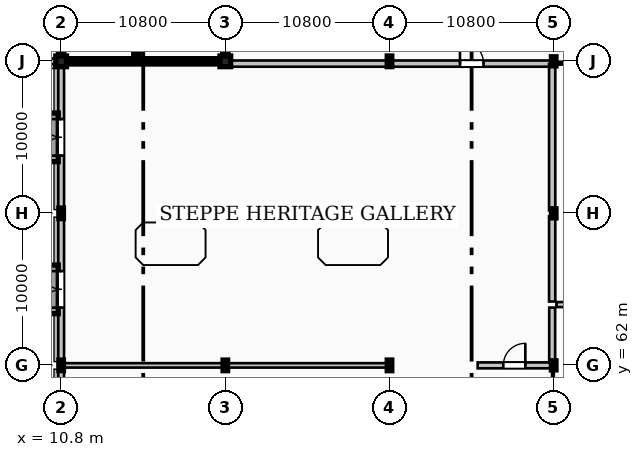
"""IFC4 building model, lengths in metres.
Left out: names, types, materials, properties, quantities, classifications, styles, units other than length and angle.
Written with IfcOpenShell. Run it as: python <this file> out.ifc"""

import sys

from ifc_helpers import new_model, si_unit, direction, frame, frame_2d, origin, origin_2d, place, context, subcontext, project, spatial, rectangle, i_section, extrude, element, fill, save


model = new_model("IFC4")
c1 = context("Model", 3, precision=1e-05, world=origin(), true_north=direction((0.0, 1.0)))
c2 = subcontext(c1, "Body", "Model", "MODEL_VIEW")
j1 = project(units=[si_unit("LENGTHUNIT", "METRE"), si_unit("PLANEANGLEUNIT", "RADIAN")], contexts=[c1])
p1 = place(None, origin())
s1 = spatial("IfcSite", under=j1, at=p1, CompositionType="ELEMENT")
p2 = place(p1, origin())
s2 = spatial("IfcBuilding", under=s1, at=p2, CompositionType="ELEMENT")
p3 = place(p2, origin())
s3 = spatial("IfcBuildingStorey", under=s2, at=p3, CompositionType="ELEMENT", Elevation=0.0)
for number, where, z_axis, x_axis in (
    (1, (10.8, 62.0, 0.0), (0.0, 0.0, 1.0), (1.0, 0.0, 0.0)),
    (2, (10.8, 72.0, 0.0), (0.0, 0.0, 1.0), (1.0, 0.0, 0.0)),
):
    element("IfcColumn", number, at=place(p3, frame(where, z_axis=z_axis, x_axis=x_axis)), inside=s3, PredefinedType="COLUMN", context=c2, shape_type="SweptSolid", body=[
        extrude(i_section(OverallWidth=0.3, OverallDepth=0.7, WebThickness=0.017, FlangeThickness=0.032, FilletRadius=0.027, at=origin_2d()), origin(), (0.0, 0.0, 1.0), 4.8),
    ])
p4 = place(p3, frame((10.8, 82.0, 0.0), z_axis=(0.0, 0.0, 1.0), x_axis=(1.0, 0.0, 0.0)))
e3 = element("IfcColumn", 3, at=p4, inside=s3, PredefinedType="COLUMN", context=c2, shape_type="SweptSolid", body=[
    extrude(rectangle(XDim=0.7, YDim=0.7, at=origin_2d()), origin(), (0.0, 0.0, 1.0), 4.8),
])
for number, where, z_axis, x_axis in (
    (4, (21.6, 62.0, 0.0), (0.0, 0.0, 1.0), (1.0, 0.0, 0.0)),
    (5, (21.6, 72.0, 0.0), (0.0, 0.0, 1.0), (1.0, 0.0, 0.0)),
):
    element("IfcColumn", number, at=place(p3, frame(where, z_axis=z_axis, x_axis=x_axis)), inside=s3, PredefinedType="COLUMN", context=c2, shape_type="SweptSolid", body=[
        extrude(i_section(OverallWidth=0.3, OverallDepth=0.7, WebThickness=0.017, FlangeThickness=0.032, FilletRadius=0.027, at=origin_2d()), origin(), (0.0, 0.0, 1.0), 4.8),
    ])
p5 = place(p3, frame((21.6, 82.0, 0.0), z_axis=(0.0, 0.0, 1.0), x_axis=(1.0, 0.0, 0.0)))
e6 = element("IfcColumn", 6, at=p5, inside=s3, PredefinedType="COLUMN", context=c2, shape_type="SweptSolid", body=[
    extrude(rectangle(XDim=0.7, YDim=0.7, at=origin_2d()), origin(), (0.0, 0.0, 1.0), 4.8),
])
for number, where, z_axis, x_axis in (
    (7, (32.4, 62.0, 0.0), (0.0, 0.0, 1.0), (1.0, 0.0, 0.0)),
    (8, (32.4, 72.0, 0.0), (0.0, 0.0, 1.0), (1.0, 0.0, 0.0)),
    (9, (32.4, 82.0, 0.0), (0.0, 0.0, 1.0), (1.0, 0.0, 0.0)),
):
    element("IfcColumn", number, at=place(p3, frame(where, z_axis=z_axis, x_axis=x_axis)), inside=s3, PredefinedType="COLUMN", context=c2, shape_type="SweptSolid", body=[
        extrude(i_section(OverallWidth=0.3, OverallDepth=0.7, WebThickness=0.017, FlangeThickness=0.032, FilletRadius=0.027, at=origin_2d()), origin(), (0.0, 0.0, 1.0), 4.8),
    ])
for number, where, z_axis, x_axis in (
    (10, (43.2, 62.0, 0.0), (0.0, 0.0, 1.0), (1.0, 0.0, 0.0)),
    (11, (43.2, 72.0, 0.0), (0.0, 0.0, 1.0), (1.0, 0.0, 0.0)),
    (12, (43.2, 82.0, 0.0), (0.0, 0.0, 1.0), (1.0, 0.0, 0.0)),
):
    element("IfcColumn", number, at=place(p3, frame(where, z_axis=z_axis, x_axis=x_axis)), inside=s3, PredefinedType="COLUMN", context=c2, shape_type="SweptSolid", body=[
        extrude(i_section(OverallWidth=0.3, OverallDepth=0.6, WebThickness=0.015, FlangeThickness=0.03, FilletRadius=0.027, at=origin_2d()), origin(), (0.0, 0.0, 1.0), 4.8),
    ])
p6 = place(p3, frame((0.145, 82.0, 0.0), z_axis=(0.0, 0.0, 1.0), x_axis=(1.0, 0.0, 0.0)))
e13 = element("IfcWall", 13, at=p6, inside=s3, PredefinedType="STANDARD", context=c2, shape_type="SweptSolid", body=[
    extrude(rectangle(XDim=10.51, YDim=0.38, at=frame_2d((5.255, 0.0))), origin(), (0.0, 0.0, 1.0), 4.009),
])
p7 = place(p6, frame((3.805, 0.0, 1.0)))
e14 = element("IfcOpeningElement", 14, at=p7, cuts=e13, PredefinedType="OPENING", context=c2, shape_type="SweptSolid", body=[
    extrude(rectangle(XDim=2.9, YDim=2.5, at=frame_2d((1.45, 1.25))), frame((0.0, 0.2, 0.0), z_axis=(0.0, -1.0, 0.0), x_axis=(1.0, 0.0, 0.0)), (0.0, 0.0, 1.0), 0.4),
])
p8 = place(p6, frame((7.655, 0.0, 0.0)))
e15 = element("IfcOpeningElement", 15, at=p8, cuts=e13, PredefinedType="OPENING", context=c2, shape_type="SweptSolid", body=[
    extrude(rectangle(XDim=2.0, YDim=2.3, at=frame_2d((1.0, 1.15))), frame((0.0, 0.2, 0.0), z_axis=(0.0, -1.0, 0.0), x_axis=(1.0, 0.0, 0.0)), (0.0, 0.0, 1.0), 0.4),
])
p9 = place(p3, frame((10.8, 81.855, 0.0), z_axis=(0.0, 0.0, 1.0), x_axis=(0.0, -1.0, 0.0)))
e16 = element("IfcWall", 16, at=p9, inside=s3, PredefinedType="STANDARD", context=c2, shape_type="SweptSolid", body=[
    extrude(rectangle(XDim=9.71, YDim=0.38, at=frame_2d((4.855, 0.0))), origin(), (0.0, 0.0, 1.0), 4.04),
])
p10 = place(p9, frame((3.655, 0.0, 0.0)))
e17 = element("IfcOpeningElement", 17, at=p10, cuts=e16, PredefinedType="OPENING", context=c2, shape_type="SweptSolid", body=[
    extrude(rectangle(XDim=2.4, YDim=2.6, at=frame_2d((1.2, 1.3))), frame((0.0, 0.2, 0.0), z_axis=(0.0, -1.0, 0.0), x_axis=(1.0, 0.0, 0.0)), (0.0, 0.0, 1.0), 0.4),
])
p11 = place(p3, frame((10.8, 71.855, 0.0), z_axis=(0.0, 0.0, 1.0), x_axis=(0.0, -1.0, 0.0)))
e18 = element("IfcWall", 18, at=p11, inside=s3, PredefinedType="STANDARD", context=c2, shape_type="SweptSolid", body=[
    extrude(rectangle(XDim=9.71, YDim=0.38, at=frame_2d((4.855, 0.0))), origin(), (0.0, 0.0, 1.0), 4.04),
])
p12 = place(p11, frame((3.655, 0.0, 0.0)))
e19 = element("IfcOpeningElement", 19, at=p12, cuts=e18, PredefinedType="OPENING", context=c2, shape_type="SweptSolid", body=[
    extrude(rectangle(XDim=2.4, YDim=2.6, at=frame_2d((1.2, 1.3))), frame((0.0, 0.2, 0.0), z_axis=(0.0, -1.0, 0.0), x_axis=(1.0, 0.0, 0.0)), (0.0, 0.0, 1.0), 0.4),
])
p13 = place(p3, frame((10.8, 61.855, 0.0), z_axis=(0.0, 0.0, 1.0), x_axis=(0.0, -1.0, 0.0)))
e20 = element("IfcWall", 20, at=p13, inside=s3, PredefinedType="STANDARD", context=c2, shape_type="SweptSolid", body=[
    extrude(rectangle(XDim=11.71, YDim=0.38, at=frame_2d((5.855, 0.0))), origin(), (0.0, 0.0, 1.0), 3.939),
])
p14 = place(p13, frame((4.655, 0.0, 0.0)))
e21 = element("IfcOpeningElement", 21, at=p14, cuts=e20, PredefinedType="OPENING", context=c2, shape_type="SweptSolid", body=[
    extrude(rectangle(XDim=2.4, YDim=2.6, at=frame_2d((1.2, 1.3))), frame((0.0, 0.2, 0.0), z_axis=(0.0, -1.0, 0.0), x_axis=(1.0, 0.0, 0.0)), (0.0, 0.0, 1.0), 0.4),
])
p15 = place(p3, frame((11.15, 82.0, 0.0), z_axis=(0.0, 0.0, 1.0), x_axis=(1.0, 0.0, 0.0)))
e22 = element("IfcWall", 22, at=p15, inside=s3, PredefinedType="SHEAR", context=c2, shape_type="SweptSolid", body=[
    extrude(rectangle(XDim=10.1, YDim=0.35, at=frame_2d((5.05, 0.0))), origin(), (0.0, 0.0, 1.0), 4.56),
])
p16 = place(p3, frame((10.8, 82.35, 0.0), z_axis=(0.0, 0.0, 1.0), x_axis=(0.0, 1.0, 0.0)))
e23 = element("IfcWall", 23, at=p16, inside=s3, PredefinedType="SHEAR", context=c2, shape_type="SweptSolid", body=[
    extrude(rectangle(XDim=9.3, YDim=0.35, at=frame_2d((4.65, 0.0))), origin(), (0.0, 0.0, 1.0), 4.56),
])
p17 = place(p3, frame((21.6, 82.35, 0.0), z_axis=(0.0, 0.0, 1.0), x_axis=(0.0, 1.0, 0.0)))
e24 = element("IfcWall", 24, at=p17, inside=s3, PredefinedType="SHEAR", context=c2, shape_type="SweptSolid", body=[
    extrude(rectangle(XDim=9.3, YDim=0.35, at=frame_2d((4.65, 0.0))), origin(), (0.0, 0.0, 1.0), 4.56),
])
p18 = place(p17, frame((0.83, 0.0, 0.0)))
e25 = element("IfcOpeningElement", 25, at=p18, cuts=e24, PredefinedType="OPENING", context=c2, shape_type="SweptSolid", body=[
    extrude(rectangle(XDim=1.8, YDim=2.25, at=frame_2d((0.9, 1.125))), frame((0.0, 0.185, 0.0), z_axis=(0.0, -1.0, 0.0), x_axis=(1.0, 0.0, 0.0)), (0.0, 0.0, 1.0), 0.37),
])
p19 = place(p3, frame((15.75, 82.175, 0.0), z_axis=(0.0, 0.0, 1.0), x_axis=(0.0, 1.0, 0.0)))
e26 = element("IfcWall", 26, at=p19, inside=s3, PredefinedType="SHEAR", context=c2, shape_type="SweptSolid", body=[
    extrude(rectangle(XDim=9.65, YDim=0.35, at=frame_2d((4.825, 0.0))), origin(), (0.0, 0.0, 1.0), 4.56),
])
p20 = place(p19, frame((0.9, 0.0, 0.0)))
e27 = element("IfcOpeningElement", 27, at=p20, cuts=e26, PredefinedType="OPENING", context=c2, shape_type="SweptSolid", body=[
    extrude(rectangle(XDim=1.1, YDim=2.2, at=frame_2d((0.55, 1.1))), frame((0.0, 0.185, 0.0), z_axis=(0.0, -1.0, 0.0), x_axis=(1.0, 0.0, 0.0)), (0.0, 0.0, 1.0), 0.37),
])
p21 = place(p3, frame((38.2, 62.0, 0.0), z_axis=(0.0, 0.0, 1.0), x_axis=(1.0, 0.0, 0.0)))
e28 = element("IfcWall", 28, at=p21, inside=s3, PredefinedType="PARTITIONING", context=c2, shape_type="SweptSolid", body=[
    extrude(rectangle(XDim=4.82, YDim=0.39, at=frame_2d((2.41, 0.0))), origin(), (0.0, 0.0, 1.0), 4.049),
])
p22 = place(p21, frame((1.685, 0.0, 0.0)))
e29 = element("IfcOpeningElement", 29, at=p22, cuts=e28, PredefinedType="OPENING", context=c2, shape_type="SweptSolid", body=[
    extrude(rectangle(XDim=1.45, YDim=2.35, at=frame_2d((0.725, 1.175))), frame((0.0, 0.205, 0.0), z_axis=(0.0, -1.0, 0.0), x_axis=(1.0, 0.0, 0.0)), (0.0, 0.0, 1.0), 0.41),
])
p23 = place(p3, frame((21.78, 81.85, 0.0), z_axis=(0.0, 0.0, 1.0), x_axis=(1.0, 0.0, 0.0)))
e30 = element("IfcWall", 30, at=p23, inside=s3, PredefinedType="PARTITIONING", context=c2, shape_type="SweptSolid", body=[
    extrude(rectangle(XDim=10.42, YDim=0.41, at=frame_2d((5.21, 0.0))), origin(), (0.0, 0.0, 1.0), 3.989),
])
p24 = place(p3, frame((32.6, 81.85, 0.0), z_axis=(0.0, 0.0, 1.0), x_axis=(1.0, 0.0, 0.0)))
e31 = element("IfcWall", 31, at=p24, inside=s3, PredefinedType="PARTITIONING", context=c2, shape_type="SweptSolid", body=[
    extrude(rectangle(XDim=10.42, YDim=0.41, at=frame_2d((5.21, 0.0))), origin(), (0.0, 0.0, 1.0), 3.989),
])
p25 = place(p24, frame((4.435, 0.0, 0.0)))
e32 = element("IfcOpeningElement", 32, at=p25, cuts=e31, PredefinedType="OPENING", context=c2, shape_type="SweptSolid", body=[
    extrude(rectangle(XDim=1.55, YDim=2.4, at=frame_2d((0.775, 1.2))), frame((0.0, 0.215, 0.0), z_axis=(0.0, -1.0, 0.0), x_axis=(1.0, 0.0, 0.0)), (0.0, 0.0, 1.0), 0.43),
])
p26 = place(p3, frame((43.38, 81.85, 0.0), z_axis=(0.0, 0.0, 1.0), x_axis=(1.0, 0.0, 0.0)))
e33 = element("IfcWall", 33, at=p26, inside=s3, PredefinedType="PARTITIONING", context=c2, shape_type="SweptSolid", body=[
    extrude(rectangle(XDim=10.44, YDim=0.13, at=frame_2d((5.22, 0.0))), origin(), (0.0, 0.0, 1.0), 3.989),
])
p27 = place(p26, frame((4.395, 0.0, 0.0)))
e34 = element("IfcOpeningElement", 34, at=p27, cuts=e33, PredefinedType="OPENING", context=c2, shape_type="SweptSolid", body=[
    extrude(rectangle(XDim=1.65, YDim=2.4, at=frame_2d((0.825, 1.2))), frame((0.0, 0.075, 0.0), z_axis=(0.0, -1.0, 0.0), x_axis=(1.0, 0.0, 0.0)), (0.0, 0.0, 1.0), 0.15),
])
p28 = place(p3, frame((43.15, 50.18, 0.0), z_axis=(0.0, 0.0, 1.0), x_axis=(0.0, 1.0, 0.0)))
e35 = element("IfcWall", 35, at=p28, inside=s3, PredefinedType="PARTITIONING", context=c2, shape_type="SweptSolid", body=[
    extrude(rectangle(XDim=11.64, YDim=0.11, at=frame_2d((5.82, 0.0))), origin(), (0.0, 0.0, 1.0), 3.939),
])
p29 = place(p28, frame((5.29, 0.0, 0.0)))
e36 = element("IfcOpeningElement", 36, at=p29, cuts=e35, PredefinedType="OPENING", context=c2, shape_type="SweptSolid", body=[
    extrude(rectangle(XDim=1.06, YDim=2.22, at=frame_2d((0.53, 1.11))), frame((0.0, 0.065, 0.0), z_axis=(0.0, -1.0, 0.0), x_axis=(1.0, 0.0, 0.0)), (0.0, 0.0, 1.0), 0.13),
])
p30 = place(p3, frame((10.98, 62.0, 0.0), z_axis=(0.0, 0.0, 1.0), x_axis=(1.0, 0.0, 0.0)))
e37 = element("IfcWall", 37, at=p30, inside=s3, PredefinedType="PARTITIONING", context=c2, shape_type="SweptSolid", body=[
    extrude(rectangle(XDim=10.42, YDim=0.29, at=frame_2d((5.21, 0.0))), origin(), (0.0, 0.0, 1.0), 4.049),
])
p31 = place(p3, frame((21.8, 62.0, 0.0), z_axis=(0.0, 0.0, 1.0), x_axis=(1.0, 0.0, 0.0)))
e38 = element("IfcWall", 38, at=p31, inside=s3, PredefinedType="PARTITIONING", context=c2, shape_type="SweptSolid", body=[
    extrude(rectangle(XDim=10.4, YDim=0.29, at=frame_2d((5.2, 0.0))), origin(), (0.0, 0.0, 1.0), 4.049),
])
p32 = place(p3, frame((43.38, 66.0, 0.0), z_axis=(0.0, 0.0, 1.0), x_axis=(1.0, 0.0, 0.0)))
e39 = element("IfcWall", 39, at=p32, inside=s3, PredefinedType="PARTITIONING", context=c2, shape_type="SweptSolid", body=[
    extrude(rectangle(XDim=10.44, YDim=0.33, at=frame_2d((5.22, 0.0))), origin(), (0.0, 0.0, 1.0), 4.52),
])
p33 = place(p3, frame((43.1, 62.18, 0.0), z_axis=(0.0, 0.0, 1.0), x_axis=(0.0, 1.0, 0.0)))
e40 = element("IfcWall", 40, at=p33, inside=s3, PredefinedType="PARTITIONING", context=c2, shape_type="SweptSolid", body=[
    extrude(rectangle(XDim=3.62, YDim=0.39, at=frame_2d((1.81, 0.0))), origin(), (0.0, 0.0, 1.0), 4.04),
])
p34 = place(p3, frame((43.1, 66.2, 0.0), z_axis=(0.0, 0.0, 1.0), x_axis=(0.0, 1.0, 0.0)))
e41 = element("IfcWall", 41, at=p34, inside=s3, PredefinedType="PARTITIONING", context=c2, shape_type="SweptSolid", body=[
    extrude(rectangle(XDim=5.6, YDim=0.41, at=frame_2d((2.8, 0.0))), origin(), (0.0, 0.0, 1.0), 4.52),
])
p35 = place(p3, frame((43.1, 72.2, 0.0), z_axis=(0.0, 0.0, 1.0), x_axis=(0.0, 1.0, 0.0)))
e42 = element("IfcWall", 42, at=p35, inside=s3, PredefinedType="PARTITIONING", context=c2, shape_type="SweptSolid", body=[
    extrude(rectangle(XDim=9.62, YDim=0.41, at=frame_2d((4.81, 0.0))), origin(), (0.0, 0.0, 1.0), 4.52),
])
p36 = place(p10, frame((2.4, 0.0, 0.0), z_axis=(0.0, 0.0, 1.0), x_axis=(-1.0, 0.0, 0.0)))
e43 = element("IfcDoor", 43, at=p36, inside=s3, OperationType="DOUBLE_DOOR_SINGLE_SWING", PredefinedType="DOOR", context=c2, shape_type="SweptSolid", body=[
    extrude(rectangle(XDim=2.4, YDim=2.6, at=frame_2d((1.2, 1.3))), frame((0.0, 0.025, 0.0), z_axis=(0.0, -1.0, 0.0), x_axis=(1.0, 0.0, 0.0)), (0.0, 0.0, 1.0), 0.05),
])
fill(e17, e43)
p37 = place(p12, frame((2.4, 0.0, 0.0), z_axis=(0.0, 0.0, 1.0), x_axis=(-1.0, 0.0, 0.0)))
e44 = element("IfcDoor", 44, at=p37, inside=s3, OperationType="DOUBLE_DOOR_SINGLE_SWING", PredefinedType="DOOR", context=c2, shape_type="SweptSolid", body=[
    extrude(rectangle(XDim=2.4, YDim=2.6, at=frame_2d((1.2, 1.3))), frame((0.0, 0.025, 0.0), z_axis=(0.0, -1.0, 0.0), x_axis=(1.0, 0.0, 0.0)), (0.0, 0.0, 1.0), 0.05),
])
fill(e19, e44)
p38 = place(p22, origin())
e45 = element("IfcDoor", 45, at=p38, inside=s3, OperationType="SINGLE_SWING_RIGHT", PredefinedType="DOOR", context=c2, shape_type="SweptSolid", body=[
    extrude(rectangle(XDim=1.45, YDim=2.35, at=frame_2d((0.725, 1.175))), frame((0.0, 0.025, 0.0), z_axis=(0.0, -1.0, 0.0), x_axis=(1.0, 0.0, 0.0)), (0.0, 0.0, 1.0), 0.05),
])
fill(e29, e45)
p39 = place(p25, origin())
e46 = element("IfcDoor", 46, at=p39, inside=s3, OperationType="SINGLE_SWING_LEFT", PredefinedType="DOOR", context=c2, shape_type="SweptSolid", body=[
    extrude(rectangle(XDim=1.55, YDim=2.4, at=frame_2d((0.775, 1.2))), frame((0.0, 0.025, 0.0), z_axis=(0.0, -1.0, 0.0), x_axis=(1.0, 0.0, 0.0)), (0.0, 0.0, 1.0), 0.05),
])
fill(e32, e46)
save(model, sys.argv[1])
